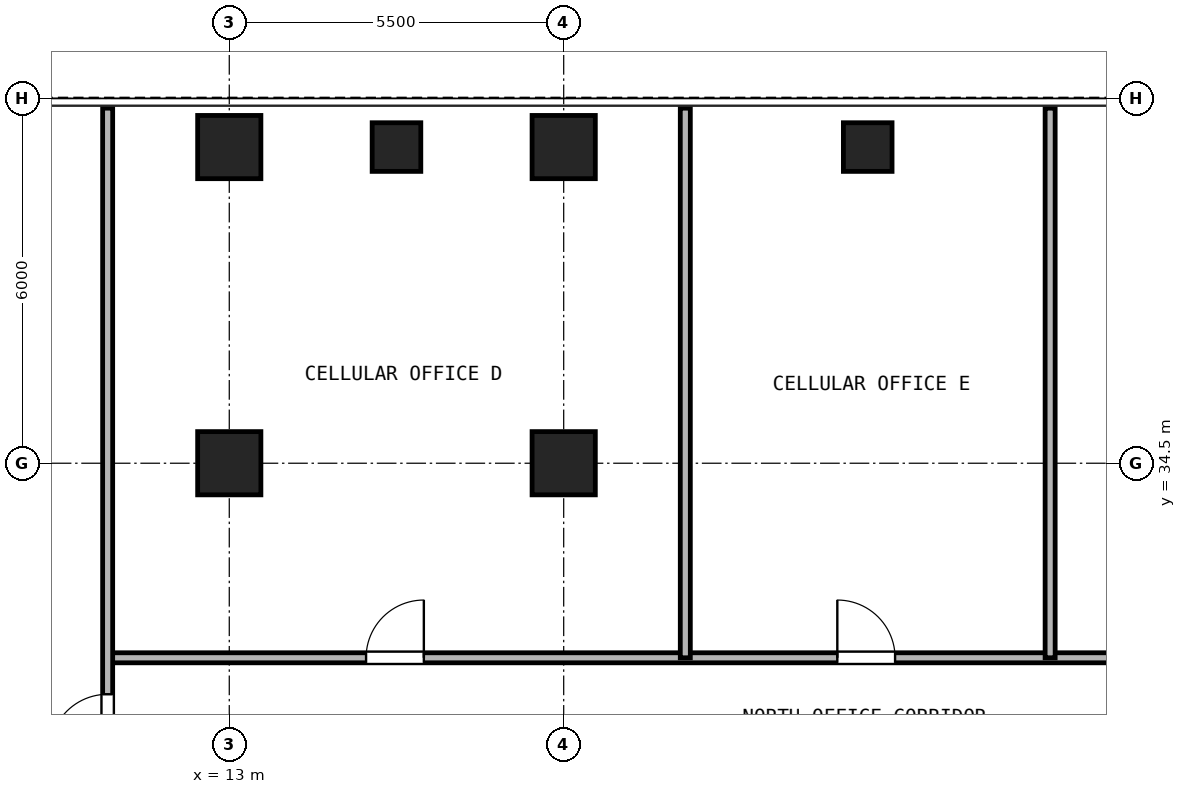
"""IFC4 building model, lengths in metres.
Left out: names, types, materials, properties, quantities, classifications, styles, units other than length and angle.
Written with IfcOpenShell. Run it as: python <this file> out.ifc"""

import sys

from ifc_helpers import new_model, si_unit, direction, frame, frame_2d, origin, origin_2d, place, context, subcontext, project, spatial, rectangle, hollow_rectangle, extrude, source, transform, mapped, element, fill, save


model = new_model("IFC4")
c1 = context("Model", 3, precision=1e-05, world=origin(), true_north=direction((0.0, 1.0)))
c2 = subcontext(c1, "Body", "Model", "MODEL_VIEW")
j1 = project(units=[si_unit("LENGTHUNIT", "METRE"), si_unit("PLANEANGLEUNIT", "RADIAN")], contexts=[c1])
p1 = place(None, origin())
s1 = spatial("IfcSite", under=j1, at=p1, CompositionType="ELEMENT")
p2 = place(p1, origin())
s2 = spatial("IfcBuilding", under=s1, at=p2, CompositionType="ELEMENT")
p3 = place(p2, frame((0.0, 0.0, 72.9)))
s3 = spatial("IfcBuildingStorey", under=s2, at=p3, CompositionType="ELEMENT", Elevation=72.9)
m1 = source(origin(), c2, "Body", "SweptSolid", [
    extrude(hollow_rectangle(XDim=1.04, YDim=1.04, WallThickness=0.065, at=origin_2d()), origin(), (0.0, 0.0, 1.0), 3.24),
])
for number, where, z_axis, x_axis in (
    (1, (13.0, 39.7, 0.0), (0.0, 0.0, 1.0), (1.0, 0.0, 0.0)),
    (2, (18.5, 39.7, 0.0), (0.0, 0.0, 1.0), (1.0, 0.0, 0.0)),
    (3, (13.0, 34.5, 0.0), (0.0, 0.0, 1.0), (1.0, 0.0, 0.0)),
    (4, (18.5, 34.5, 0.0), (0.0, 0.0, 1.0), (1.0, 0.0, 0.0)),
):
    element("IfcColumn", number, at=place(p3, frame(where, z_axis=z_axis, x_axis=x_axis)), inside=s3, PredefinedType="COLUMN", context=c2, shape_type="MappedRepresentation", body=[
        mapped(m1, transform((0.0, 0.0, 0.0), x_axis=(1.0, 0.0, 0.0), y_axis=(0.0, 1.0, 0.0), z_axis=(0.0, 0.0, 1.0), scale=1.0)),
    ])
m2 = source(origin(), c2, "Body", "SweptSolid", [
    extrude(hollow_rectangle(XDim=0.8, YDim=0.8, WallThickness=0.045, at=origin_2d()), origin(), (0.0, 0.0, 1.0), 3.24),
])
for number, where, z_axis, x_axis in (
    (5, (15.75, 39.7, 0.0), (0.0, 0.0, 1.0), (1.0, 0.0, 0.0)),
    (6, (23.5, 39.7, 0.0), (0.0, 0.0, 1.0), (1.0, 0.0, 0.0)),
):
    element("IfcColumn", number, at=place(p3, frame(where, z_axis=z_axis, x_axis=x_axis)), inside=s3, PredefinedType="COLUMN", context=c2, shape_type="MappedRepresentation", body=[
        mapped(m2, transform((0.0, 0.0, 0.0), x_axis=(1.0, 0.0, 0.0), y_axis=(0.0, 1.0, 0.0), z_axis=(0.0, 0.0, 1.0), scale=1.0)),
    ])
p4 = place(p3, frame((11.0, 31.3, 0.0), z_axis=(0.0, 0.0, 1.0), x_axis=(1.0, 0.0, 0.0)))
e7 = element("IfcWall", 7, at=p4, inside=s3, PredefinedType="PARTITIONING", context=c2, shape_type="SweptSolid", body=[
    extrude(rectangle(XDim=25.0, YDim=0.165, at=frame_2d((12.5, 0.0))), origin(), (0.0, 0.0, 1.0), 3.24),
])
p5 = place(p4, frame((4.25, 0.0, 0.0)))
e8 = element("IfcOpeningElement", 8, at=p5, cuts=e7, PredefinedType="OPENING", context=c2, shape_type="SweptSolid", body=[
    extrude(rectangle(XDim=0.95, YDim=2.15, at=frame_2d((0.475, 1.075))), frame((0.0, 0.093, 0.0), z_axis=(0.0, -1.0, 0.0), x_axis=(1.0, 0.0, 0.0)), (0.0, 0.0, 1.0), 0.185),
])
p6 = place(p4, frame((12.0, 0.0, 0.0)))
e9 = element("IfcOpeningElement", 9, at=p6, cuts=e7, PredefinedType="OPENING", context=c2, shape_type="SweptSolid", body=[
    extrude(rectangle(XDim=0.95, YDim=2.15, at=frame_2d((0.475, 1.075))), frame((0.0, 0.093, 0.0), z_axis=(0.0, -1.0, 0.0), x_axis=(1.0, 0.0, 0.0)), (0.0, 0.0, 1.0), 0.185),
])
p7 = place(p4, frame((17.5, 0.0, 0.0)))
e10 = element("IfcOpeningElement", 10, at=p7, cuts=e7, PredefinedType="OPENING", context=c2, shape_type="SweptSolid", body=[
    extrude(rectangle(XDim=0.95, YDim=2.15, at=frame_2d((0.475, 1.075))), frame((0.0, 0.093, 0.0), z_axis=(0.0, -1.0, 0.0), x_axis=(1.0, 0.0, 0.0)), (0.0, 0.0, 1.0), 0.185),
])
p8 = place(p4, frame((22.25, 0.0, 0.0)))
e11 = element("IfcOpeningElement", 11, at=p8, cuts=e7, PredefinedType="OPENING", context=c2, shape_type="SweptSolid", body=[
    extrude(rectangle(XDim=0.95, YDim=2.15, at=frame_2d((0.475, 1.075))), frame((0.0, 0.093, 0.0), z_axis=(0.0, -1.0, 0.0), x_axis=(1.0, 0.0, 0.0)), (0.0, 0.0, 1.0), 0.185),
])
p9 = place(p3, frame((11.0, 0.16, 0.0), z_axis=(0.0, 0.0, 1.0), x_axis=(0.0, 1.0, 0.0)))
e12 = element("IfcWall", 12, at=p9, inside=s3, PredefinedType="PARTITIONING", context=c2, shape_type="SweptSolid", body=[
    extrude(rectangle(XDim=40.18, YDim=0.165, at=frame_2d((20.09, 0.0))), origin(), (0.0, 0.0, 1.0), 3.24),
])
p10 = place(p9, frame((9.39, 0.0, 0.0)))
e13 = element("IfcOpeningElement", 13, at=p10, cuts=e12, PredefinedType="OPENING", context=c2, shape_type="SweptSolid", body=[
    extrude(rectangle(XDim=0.95, YDim=2.15, at=frame_2d((0.475, 1.075))), frame((0.0, 0.093, 0.0), z_axis=(0.0, -1.0, 0.0), x_axis=(1.0, 0.0, 0.0)), (0.0, 0.0, 1.0), 0.185),
])
p11 = place(p9, frame((29.59, 0.0, 0.0)))
e14 = element("IfcOpeningElement", 14, at=p11, cuts=e12, PredefinedType="OPENING", context=c2, shape_type="SweptSolid", body=[
    extrude(rectangle(XDim=0.95, YDim=2.15, at=frame_2d((0.475, 1.075))), frame((0.0, 0.093, 0.0), z_axis=(0.0, -1.0, 0.0), x_axis=(1.0, 0.0, 0.0)), (0.0, 0.0, 1.0), 0.185),
])
for number, where, z_axis, x_axis in (
    (15, (20.5, 31.3, 0.0), (0.0, 0.0, 1.0), (0.0, 1.0, 0.0)),
    (16, (26.5, 31.3, 0.0), (0.0, 0.0, 1.0), (0.0, 1.0, 0.0)),
):
    element("IfcWall", number, at=place(p3, frame(where, z_axis=z_axis, x_axis=x_axis)), inside=s3, PredefinedType="PARTITIONING", context=c2, shape_type="SweptSolid", body=[
        extrude(rectangle(XDim=9.04, YDim=0.165, at=frame_2d((4.52, 0.0))), origin(), (0.0, 0.0, 1.0), 3.24),
    ])
p12 = place(p5, origin())
e17 = element("IfcDoor", 17, at=p12, inside=s3, OperationType="SINGLE_SWING_RIGHT", PredefinedType="DOOR", context=c2, shape_type="SweptSolid", body=[
    extrude(rectangle(XDim=0.95, YDim=2.15, at=frame_2d((0.475, 1.075))), frame((0.0, 0.025, 0.0), z_axis=(0.0, -1.0, 0.0), x_axis=(1.0, 0.0, 0.0)), (0.0, 0.0, 1.0), 0.05),
])
fill(e8, e17)
p13 = place(p6, origin())
e18 = element("IfcDoor", 18, at=p13, inside=s3, OperationType="SINGLE_SWING_LEFT", PredefinedType="DOOR", context=c2, shape_type="SweptSolid", body=[
    extrude(rectangle(XDim=0.95, YDim=2.15, at=frame_2d((0.475, 1.075))), frame((0.0, 0.025, 0.0), z_axis=(0.0, -1.0, 0.0), x_axis=(1.0, 0.0, 0.0)), (0.0, 0.0, 1.0), 0.05),
])
fill(e9, e18)
p14 = place(p11, frame((0.95, 0.0, 0.0), z_axis=(0.0, 0.0, 1.0), x_axis=(-1.0, 0.0, 0.0)))
e19 = element("IfcDoor", 19, at=p14, inside=s3, OperationType="SINGLE_SWING_LEFT", PredefinedType="DOOR", context=c2, shape_type="SweptSolid", body=[
    extrude(rectangle(XDim=0.95, YDim=2.15, at=frame_2d((0.475, 1.075))), frame((0.0, 0.025, 0.0), z_axis=(0.0, -1.0, 0.0), x_axis=(1.0, 0.0, 0.0)), (0.0, 0.0, 1.0), 0.05),
])
fill(e14, e19)
save(model, sys.argv[1])
